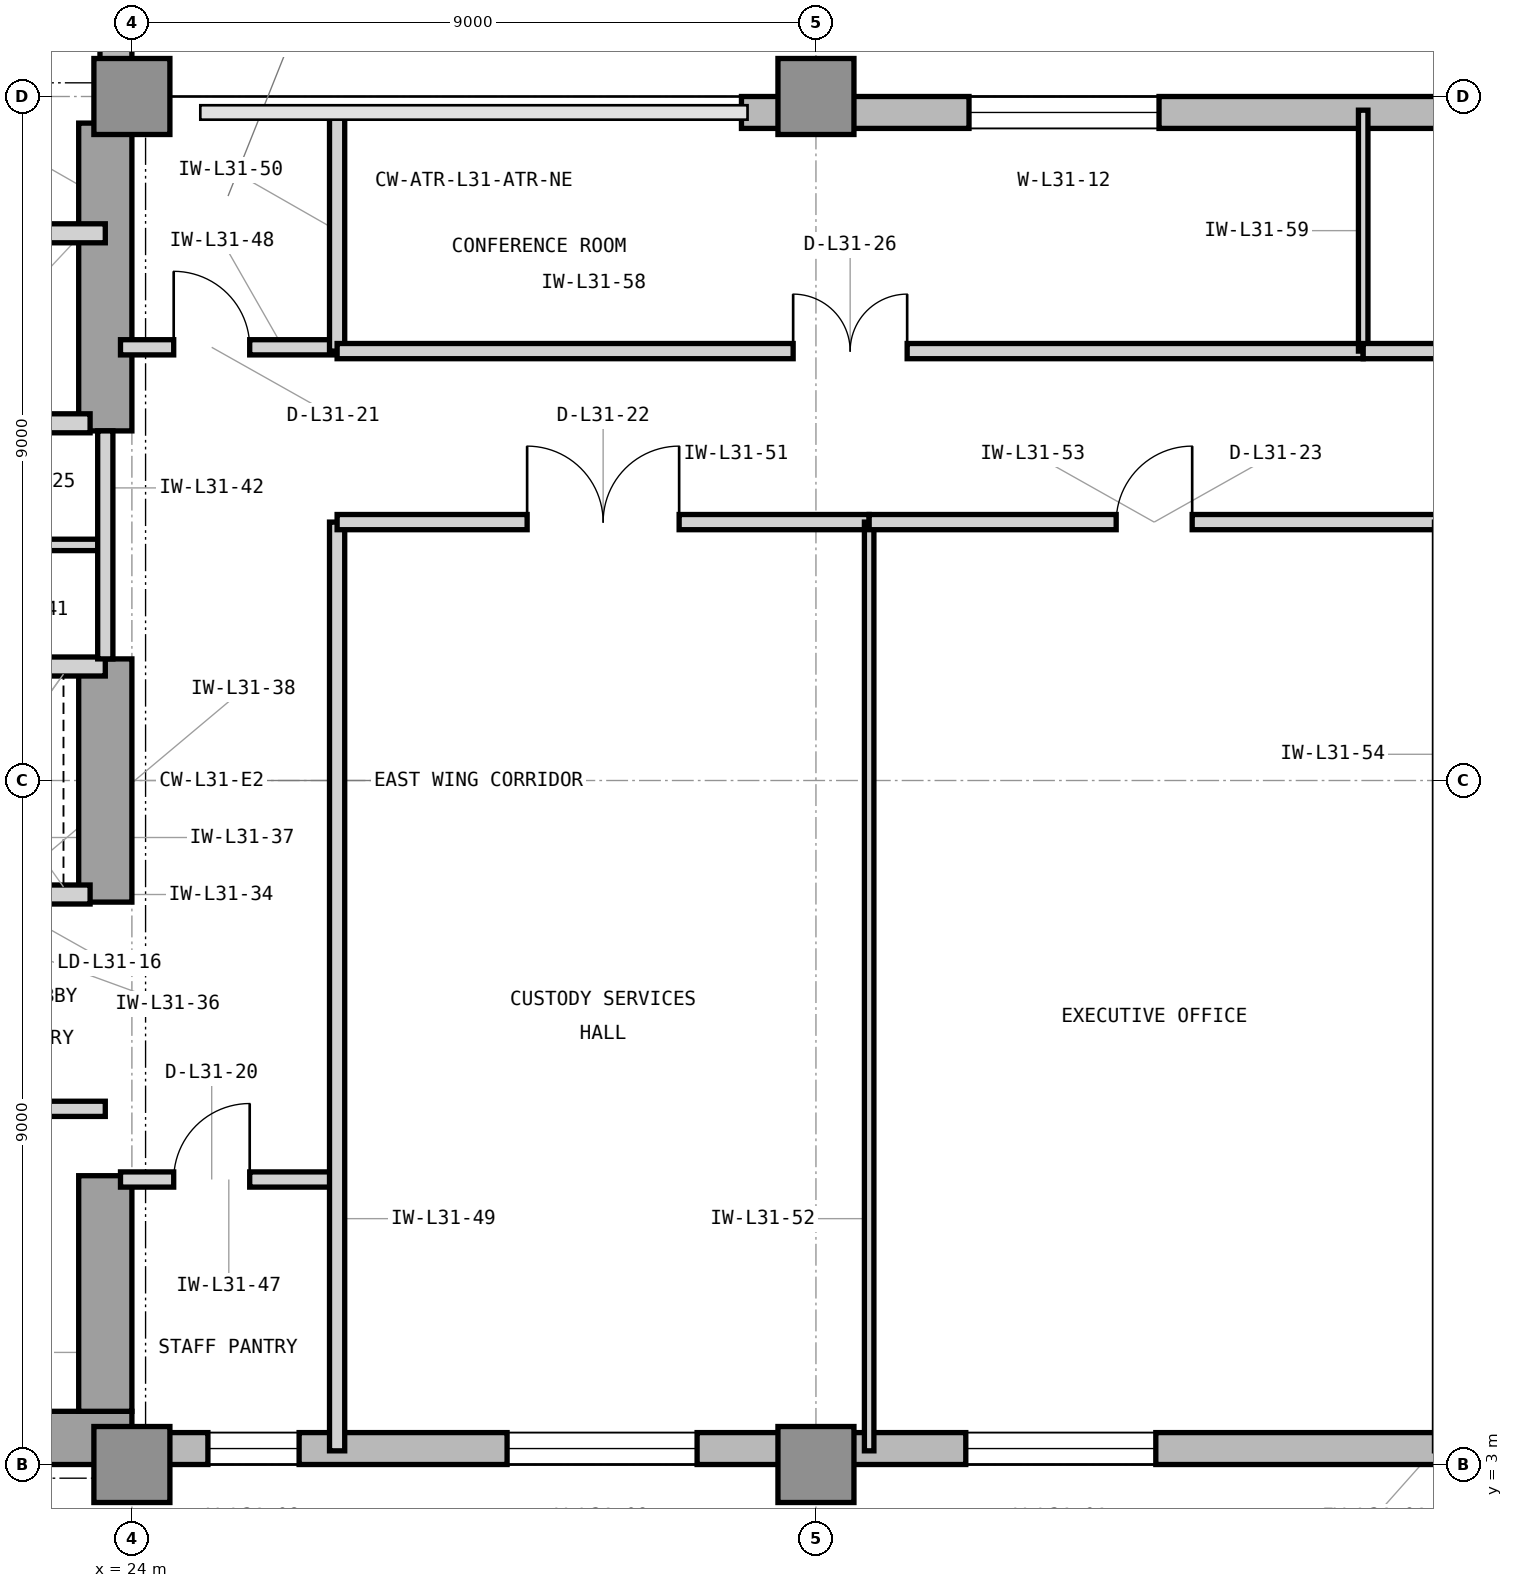
"""IFC4 building model, lengths in metres.
Left out: names, types, materials, properties, quantities, classifications, styles, units other than length and angle.
Written with IfcOpenShell. Run it as: python <this file> out.ifc"""

import sys

from ifc_helpers import new_model, si_unit, direction, frame, frame_2d, origin, origin_2d, place, context, subcontext, project, spatial, rectangle, extrude, element, fill, save


model = new_model("IFC4")
c1 = context("Model", 3, precision=1e-05, world=origin(), true_north=direction((0.0, 1.0)))
c2 = subcontext(c1, "Body", "Model", "MODEL_VIEW")
j1 = project(units=[si_unit("LENGTHUNIT", "METRE"), si_unit("PLANEANGLEUNIT", "RADIAN")], contexts=[c1])
p1 = place(None, origin())
s1 = spatial("IfcSite", under=j1, at=p1, CompositionType="ELEMENT")
p2 = place(p1, origin())
s2 = spatial("IfcBuilding", under=s1, at=p2, CompositionType="ELEMENT")
p3 = place(p2, frame((0.0, 0.0, 132.3)))
s3 = spatial("IfcBuildingStorey", under=s2, at=p3, CompositionType="ELEMENT", Elevation=132.3)
p4 = place(p3, frame((7.475, 3.35, 0.0), z_axis=(0.0, 0.0, 1.0), x_axis=(1.0, 0.0, 0.0)))
e1 = element("IfcWall", 1, at=p4, inside=s3, PredefinedType="SHEAR", context=c2, shape_type="SweptSolid", body=[
    extrude(rectangle(XDim=16.525, YDim=0.7, at=frame_2d((8.262, 0.0))), origin(), (0.0, 0.0, 1.0), 3.9),
])
p5 = place(p3, frame((23.65, 3.7, 0.0), z_axis=(0.0, 0.0, 1.0), x_axis=(0.0, 1.0, 0.0)))
e2 = element("IfcWall", 2, at=p5, inside=s3, PredefinedType="SHEAR", context=c2, shape_type="SweptSolid", body=[
    extrude(rectangle(XDim=3.1, YDim=0.7, at=frame_2d((1.55, 0.0))), origin(), (0.0, 0.0, 1.0), 3.9),
])
p6 = place(p3, frame((23.65, 10.4, 0.0), z_axis=(0.0, 0.0, 1.0), x_axis=(0.0, 1.0, 0.0)))
e3 = element("IfcWall", 3, at=p6, inside=s3, PredefinedType="SHEAR", context=c2, shape_type="SweptSolid", body=[
    extrude(rectangle(XDim=3.2, YDim=0.7, at=frame_2d((1.6, 0.0))), origin(), (0.0, 0.0, 1.0), 3.9),
])
p7 = place(p3, frame((23.65, 16.6, 0.0), z_axis=(0.0, 0.0, 1.0), x_axis=(0.0, 1.0, 0.0)))
e4 = element("IfcWall", 4, at=p7, inside=s3, PredefinedType="SHEAR", context=c2, shape_type="SweptSolid", body=[
    extrude(rectangle(XDim=4.05, YDim=0.7, at=frame_2d((2.025, 0.0))), origin(), (0.0, 0.0, 1.0), 3.9),
])
for number, where, z_axis, x_axis in (
    (5, (24.0, 3.0, 0.0), (0.0, 0.0, 1.0), (1.0, 0.0, 0.0)),
    (6, (24.0, 21.0, 0.0), (0.0, 0.0, 1.0), (1.0, 0.0, 0.0)),
    (7, (33.0, 3.0, 0.0), (0.0, 0.0, 1.0), (1.0, 0.0, 0.0)),
    (8, (33.0, 21.0, 0.0), (0.0, 0.0, 1.0), (1.0, 0.0, 0.0)),
):
    element("IfcColumn", number, at=place(p3, frame(where, z_axis=z_axis, x_axis=x_axis)), inside=s3, PredefinedType="COLUMN", context=c2, shape_type="SweptSolid", body=[
        extrude(rectangle(XDim=1.0, YDim=1.0, at=origin_2d()), origin(), (0.0, 0.0, 1.0), 3.9),
    ])
p8 = place(p3, frame((23.9, 3.21, 0.0), z_axis=(0.0, 0.0, 1.0), x_axis=(1.0, 0.0, 0.0)))
e9 = element("IfcWall", 9, at=p8, inside=s3, PredefinedType="STANDARD", context=c2, shape_type="SweptSolid", body=[
    extrude(rectangle(XDim=34.5, YDim=0.42, at=frame_2d((17.25, 0.0))), origin(), (0.0, 0.0, 1.0), 3.7),
])
p9 = place(p8, frame((11.071, 0.0, 0.85)))
e10 = element("IfcOpeningElement", 10, at=p9, cuts=e9, PredefinedType="OPENING", context=c2, shape_type="SweptSolid", body=[
    extrude(rectangle(XDim=2.5, YDim=2.25, at=frame_2d((1.25, 1.125))), frame((0.0, 0.22, 0.0), z_axis=(0.0, -1.0, 0.0), x_axis=(1.0, 0.0, 0.0)), (0.0, 0.0, 1.0), 0.44),
])
p10 = place(p8, frame((1.1, 0.0, 0.85)))
e11 = element("IfcOpeningElement", 11, at=p10, cuts=e9, PredefinedType="OPENING", context=c2, shape_type="SweptSolid", body=[
    extrude(rectangle(XDim=1.2, YDim=2.25, at=frame_2d((0.6, 1.125))), frame((0.0, 0.22, 0.0), z_axis=(0.0, -1.0, 0.0), x_axis=(1.0, 0.0, 0.0)), (0.0, 0.0, 1.0), 0.44),
])
p11 = place(p8, frame((5.036, 0.0, 0.85)))
e12 = element("IfcOpeningElement", 12, at=p11, cuts=e9, PredefinedType="OPENING", context=c2, shape_type="SweptSolid", body=[
    extrude(rectangle(XDim=2.5, YDim=2.25, at=frame_2d((1.25, 1.125))), frame((0.0, 0.22, 0.0), z_axis=(0.0, -1.0, 0.0), x_axis=(1.0, 0.0, 0.0)), (0.0, 0.0, 1.0), 0.44),
])
p12 = place(p8, frame((19.786, 0.0, 0.85)))
e13 = element("IfcOpeningElement", 13, at=p12, cuts=e9, PredefinedType="OPENING", context=c2, shape_type="SweptSolid", body=[
    extrude(rectangle(XDim=2.5, YDim=2.25, at=frame_2d((1.25, 1.125))), frame((0.0, 0.22, 0.0), z_axis=(0.0, -1.0, 0.0), x_axis=(1.0, 0.0, 0.0)), (0.0, 0.0, 1.0), 0.44),
])
p13 = place(p8, frame((25.086, 0.0, 0.85)))
e14 = element("IfcOpeningElement", 14, at=p13, cuts=e9, PredefinedType="OPENING", context=c2, shape_type="SweptSolid", body=[
    extrude(rectangle(XDim=1.2, YDim=2.25, at=frame_2d((0.6, 1.125))), frame((0.0, 0.22, 0.0), z_axis=(0.0, -1.0, 0.0), x_axis=(1.0, 0.0, 0.0)), (0.0, 0.0, 1.0), 0.44),
])
p14 = place(p3, frame((58.4, 20.79, 0.0), z_axis=(0.0, 0.0, 1.0), x_axis=(-1.0, 0.0, 0.0)))
e15 = element("IfcWall", 15, at=p14, inside=s3, PredefinedType="STANDARD", context=c2, shape_type="SweptSolid", body=[
    extrude(rectangle(XDim=26.38, YDim=0.42, at=frame_2d((13.19, 0.0))), origin(), (0.0, 0.0, 1.0), 3.7),
])
p15 = place(p14, frame((11.94, 0.0, 0.85)))
e16 = element("IfcOpeningElement", 16, at=p15, cuts=e15, PredefinedType="OPENING", context=c2, shape_type="SweptSolid", body=[
    extrude(rectangle(XDim=2.5, YDim=2.25, at=frame_2d((1.25, 1.125))), frame((0.0, 0.22, 0.0), z_axis=(0.0, -1.0, 0.0), x_axis=(1.0, 0.0, 0.0)), (0.0, 0.0, 1.0), 0.44),
])
p16 = place(p14, frame((20.886, 0.0, 0.85)))
e17 = element("IfcOpeningElement", 17, at=p16, cuts=e15, PredefinedType="OPENING", context=c2, shape_type="SweptSolid", body=[
    extrude(rectangle(XDim=2.5, YDim=2.25, at=frame_2d((1.25, 1.125))), frame((0.0, 0.22, 0.0), z_axis=(0.0, -1.0, 0.0), x_axis=(1.0, 0.0, 0.0)), (0.0, 0.0, 1.0), 0.44),
])
p17 = place(p3, frame((23.79, 21.0, 0.0), z_axis=(0.0, 0.0, 1.0), x_axis=(0.0, 1.0, 0.0)))
e18 = element("IfcWall", 18, at=p17, inside=s3, PredefinedType="STANDARD", context=c2, shape_type="SweptSolid", body=[
    extrude(rectangle(XDim=25.4, YDim=0.42, at=frame_2d((12.7, 0.0))), origin(), (0.0, 0.0, 1.0), 3.7),
])
p18 = place(p17, frame((11.45, 0.0, 0.85)))
e19 = element("IfcOpeningElement", 19, at=p18, cuts=e18, PredefinedType="OPENING", context=c2, shape_type="SweptSolid", body=[
    extrude(rectangle(XDim=2.5, YDim=2.25, at=frame_2d((1.25, 1.125))), frame((0.0, 0.22, 0.0), z_axis=(0.0, -1.0, 0.0), x_axis=(1.0, 0.0, 0.0)), (0.0, 0.0, 1.0), 0.44),
])
p19 = place(p3, frame((21.05, 16.7, 0.0), z_axis=(0.0, 0.0, 1.0), x_axis=(1.0, 0.0, 0.0)))
e20 = element("IfcWall", 20, at=p19, inside=s3, PredefinedType="PARTITIONING", context=c2, shape_type="SweptSolid", body=[
    extrude(rectangle(XDim=2.4, YDim=0.25, at=frame_2d((1.2, 0.0))), origin(), (0.0, 0.0, 1.0), 3.233),
])
p20 = place(p3, frame((16.45, 19.2, 0.0), z_axis=(0.0, 0.0, 1.0), x_axis=(1.0, 0.0, 0.0)))
e21 = element("IfcWall", 21, at=p20, inside=s3, PredefinedType="PARTITIONING", context=c2, shape_type="SweptSolid", body=[
    extrude(rectangle(XDim=7.2, YDim=0.25, at=frame_2d((3.6, 0.0))), origin(), (0.0, 0.0, 1.0), 3.69),
])
p21 = place(p3, frame((20.55, 7.68, 0.0), z_axis=(0.0, 0.0, 1.0), x_axis=(1.0, 0.0, 0.0)))
e22 = element("IfcWall", 22, at=p21, inside=s3, PredefinedType="PARTITIONING", context=c2, shape_type="SweptSolid", body=[
    extrude(rectangle(XDim=3.1, YDim=0.2, at=frame_2d((1.55, 0.0))), origin(), (0.0, 0.0, 1.0), 3.69),
])
p22 = place(p21, frame((1.075, 0.0, 0.0)))
e23 = element("IfcOpeningElement", 23, at=p22, cuts=e22, PredefinedType="OPENING", context=c2, shape_type="SweptSolid", body=[
    extrude(rectangle(XDim=0.95, YDim=2.1, at=frame_2d((0.475, 1.05))), frame((0.0, 0.11, 0.0), z_axis=(0.0, -1.0, 0.0), x_axis=(1.0, 0.0, 0.0)), (0.0, 0.0, 1.0), 0.22),
])
p23 = place(p3, frame((21.05, 10.5, 0.0), z_axis=(0.0, 0.0, 1.0), x_axis=(1.0, 0.0, 0.0)))
e24 = element("IfcWall", 24, at=p23, inside=s3, PredefinedType="PARTITIONING", context=c2, shape_type="SweptSolid", body=[
    extrude(rectangle(XDim=2.4, YDim=0.25, at=frame_2d((1.2, 0.0))), origin(), (0.0, 0.0, 1.0), 3.233),
])
p24 = place(p23, frame((0.48, 0.0, 0.0)))
e25 = element("IfcOpeningElement", 25, at=p24, cuts=e24, PredefinedType="OPENING", context=c2, shape_type="SweptSolid", body=[
    extrude(rectangle(XDim=1.15, YDim=2.25, at=frame_2d((0.575, 1.125))), frame((0.0, 0.135, 0.0), z_axis=(0.0, -1.0, 0.0), x_axis=(1.0, 0.0, 0.0)), (0.0, 0.0, 1.0), 0.27),
])
p25 = place(p3, frame((14.7, 13.5, 0.0), z_axis=(0.0, 0.0, 1.0), x_axis=(1.0, 0.0, 0.0)))
e26 = element("IfcWall", 26, at=p25, inside=s3, PredefinedType="PARTITIONING", context=c2, shape_type="SweptSolid", body=[
    extrude(rectangle(XDim=8.95, YDim=0.25, at=frame_2d((4.475, 0.0))), origin(), (0.0, 0.0, 1.0), 3.233),
])
p26 = place(p3, frame((16.6, 15.1, 0.0), z_axis=(0.0, 0.0, 1.0), x_axis=(1.0, 0.0, 0.0)))
e27 = element("IfcWall", 27, at=p26, inside=s3, PredefinedType="PARTITIONING", context=c2, shape_type="SweptSolid", body=[
    extrude(rectangle(XDim=7.05, YDim=0.15, at=frame_2d((3.525, 0.0))), origin(), (0.0, 0.0, 1.0), 3.69),
])
p27 = place(p3, frame((23.65, 13.6, 0.0), z_axis=(0.0, 0.0, 1.0), x_axis=(0.0, 1.0, 0.0)))
e28 = element("IfcWall", 28, at=p27, inside=s3, PredefinedType="PARTITIONING", context=c2, shape_type="SweptSolid", body=[
    extrude(rectangle(XDim=3.0, YDim=0.2, at=frame_2d((1.5, 0.0))), origin(), (0.0, 0.0, 1.0), 3.69),
])
p28 = place(p3, frame((23.85, 6.75, 0.0), z_axis=(0.0, 0.0, 1.0), x_axis=(1.0, 0.0, 0.0)))
e29 = element("IfcWall", 29, at=p28, inside=s3, PredefinedType="PARTITIONING", context=c2, shape_type="SweptSolid", body=[
    extrude(rectangle(XDim=2.85, YDim=0.2, at=frame_2d((1.425, 0.0))), origin(), (0.0, 0.0, 1.0), 3.69),
])
p29 = place(p28, frame((0.7, 0.0, 0.0)))
e30 = element("IfcOpeningElement", 30, at=p29, cuts=e29, PredefinedType="OPENING", context=c2, shape_type="SweptSolid", body=[
    extrude(rectangle(XDim=1.0, YDim=2.15, at=frame_2d((0.5, 1.075))), frame((0.0, 0.11, 0.0), z_axis=(0.0, -1.0, 0.0), x_axis=(1.0, 0.0, 0.0)), (0.0, 0.0, 1.0), 0.22),
])
p30 = place(p3, frame((23.85, 17.7, 0.0), z_axis=(0.0, 0.0, 1.0), x_axis=(1.0, 0.0, 0.0)))
e31 = element("IfcWall", 31, at=p30, inside=s3, PredefinedType="PARTITIONING", context=c2, shape_type="SweptSolid", body=[
    extrude(rectangle(XDim=2.85, YDim=0.2, at=frame_2d((1.425, 0.0))), origin(), (0.0, 0.0, 1.0), 3.69),
])
p31 = place(p30, frame((0.7, 0.0, 0.0)))
e32 = element("IfcOpeningElement", 32, at=p31, cuts=e31, PredefinedType="OPENING", context=c2, shape_type="SweptSolid", body=[
    extrude(rectangle(XDim=1.0, YDim=2.15, at=frame_2d((0.5, 1.075))), frame((0.0, 0.11, 0.0), z_axis=(0.0, -1.0, 0.0), x_axis=(1.0, 0.0, 0.0)), (0.0, 0.0, 1.0), 0.22),
])
p32 = place(p3, frame((26.7, 3.18, 0.0), z_axis=(0.0, 0.0, 1.0), x_axis=(0.0, 1.0, 0.0)))
e33 = element("IfcWall", 33, at=p32, inside=s3, PredefinedType="PARTITIONING", context=c2, shape_type="SweptSolid", body=[
    extrude(rectangle(XDim=12.22, YDim=0.2, at=frame_2d((6.11, 0.0))), origin(), (0.0, 0.0, 1.0), 3.69),
])
p33 = place(p3, frame((26.7, 17.65, 0.0), z_axis=(0.0, 0.0, 1.0), x_axis=(0.0, 1.0, 0.0)))
e34 = element("IfcWall", 34, at=p33, inside=s3, PredefinedType="PARTITIONING", context=c2, shape_type="SweptSolid", body=[
    extrude(rectangle(XDim=3.17, YDim=0.2, at=frame_2d((1.585, 0.0))), origin(), (0.0, 0.0, 1.0), 3.69),
])
p34 = place(p3, frame((26.7, 15.4, 0.0), z_axis=(0.0, 0.0, 1.0), x_axis=(1.0, 0.0, 0.0)))
e35 = element("IfcWall", 35, at=p34, inside=s3, PredefinedType="PARTITIONING", context=c2, shape_type="SweptSolid", body=[
    extrude(rectangle(XDim=7.0, YDim=0.2, at=frame_2d((3.5, 0.0))), origin(), (0.0, 0.0, 1.0), 3.69),
])
p35 = place(p34, frame((2.5, 0.0, 0.0)))
e36 = element("IfcOpeningElement", 36, at=p35, cuts=e35, PredefinedType="OPENING", context=c2, shape_type="SweptSolid", body=[
    extrude(rectangle(XDim=2.0, YDim=2.5, at=frame_2d((1.0, 1.25))), frame((0.0, 0.11, 0.0), z_axis=(0.0, -1.0, 0.0), x_axis=(1.0, 0.0, 0.0)), (0.0, 0.0, 1.0), 0.22),
])
p36 = place(p3, frame((33.7, 3.18, 0.0), z_axis=(0.0, 0.0, 1.0), x_axis=(0.0, 1.0, 0.0)))
e37 = element("IfcWall", 37, at=p36, inside=s3, PredefinedType="PARTITIONING", context=c2, shape_type="SweptSolid", body=[
    extrude(rectangle(XDim=12.22, YDim=0.125, at=frame_2d((6.11, 0.0))), origin(), (0.0, 0.0, 1.0), 3.69),
])
p37 = place(p3, frame((33.7, 15.4, 0.0), z_axis=(0.0, 0.0, 1.0), x_axis=(1.0, 0.0, 0.0)))
e38 = element("IfcWall", 38, at=p37, inside=s3, PredefinedType="PARTITIONING", context=c2, shape_type="SweptSolid", body=[
    extrude(rectangle(XDim=7.5, YDim=0.2, at=frame_2d((3.75, 0.0))), origin(), (0.0, 0.0, 1.0), 3.69),
])
p38 = place(p37, frame((3.25, 0.0, 0.0)))
e39 = element("IfcOpeningElement", 39, at=p38, cuts=e38, PredefinedType="OPENING", context=c2, shape_type="SweptSolid", body=[
    extrude(rectangle(XDim=1.0, YDim=2.15, at=frame_2d((0.5, 1.075))), frame((0.0, 0.11, 0.0), z_axis=(0.0, -1.0, 0.0), x_axis=(1.0, 0.0, 0.0)), (0.0, 0.0, 1.0), 0.22),
])
p39 = place(p3, frame((26.7, 17.65, 0.0), z_axis=(0.0, 0.0, 1.0), x_axis=(1.0, 0.0, 0.0)))
e40 = element("IfcWall", 40, at=p39, inside=s3, PredefinedType="PARTITIONING", context=c2, shape_type="SweptSolid", body=[
    extrude(rectangle(XDim=13.5, YDim=0.2, at=frame_2d((6.75, 0.0))), origin(), (0.0, 0.0, 1.0), 3.69),
])
p40 = place(p39, frame((6.0, 0.0, 0.0)))
e41 = element("IfcOpeningElement", 41, at=p40, cuts=e40, PredefinedType="OPENING", context=c2, shape_type="SweptSolid", body=[
    extrude(rectangle(XDim=1.5, YDim=2.3, at=frame_2d((0.75, 1.15))), frame((0.0, 0.11, 0.0), z_axis=(0.0, -1.0, 0.0), x_axis=(1.0, 0.0, 0.0)), (0.0, 0.0, 1.0), 0.22),
])
p41 = place(p3, frame((40.2, 17.65, 0.0), z_axis=(0.0, 0.0, 1.0), x_axis=(0.0, 1.0, 0.0)))
e42 = element("IfcWall", 42, at=p41, inside=s3, PredefinedType="PARTITIONING", context=c2, shape_type="SweptSolid", body=[
    extrude(rectangle(XDim=3.17, YDim=0.125, at=frame_2d((1.585, 0.0))), origin(), (0.0, 0.0, 1.0), 3.69),
])
p42 = place(p3, frame((40.2, 17.65, 0.0), z_axis=(0.0, 0.0, 1.0), x_axis=(1.0, 0.0, 0.0)))
e43 = element("IfcWall", 43, at=p42, inside=s3, PredefinedType="PARTITIONING", context=c2, shape_type="SweptSolid", body=[
    extrude(rectangle(XDim=12.8, YDim=0.2, at=frame_2d((6.4, 0.0))), origin(), (0.0, 0.0, 1.0), 3.69),
])
p43 = place(p42, frame((5.9, 0.0, 0.0)))
e44 = element("IfcOpeningElement", 44, at=p43, cuts=e43, PredefinedType="OPENING", context=c2, shape_type="SweptSolid", body=[
    extrude(rectangle(XDim=1.0, YDim=2.15, at=frame_2d((0.5, 1.075))), frame((0.0, 0.11, 0.0), z_axis=(0.0, -1.0, 0.0), x_axis=(1.0, 0.0, 0.0)), (0.0, 0.0, 1.0), 0.22),
])
p44 = place(p9, origin())
e45 = element("IfcWindow", 45, at=p44, inside=s3, PartitioningType="SINGLE_PANEL", PredefinedType="WINDOW", context=c2, shape_type="SweptSolid", body=[
    extrude(rectangle(XDim=2.5, YDim=2.25, at=frame_2d((1.25, 1.125))), frame((0.0, 0.11, 0.0), z_axis=(0.0, -1.0, 0.0), x_axis=(1.0, 0.0, 0.0)), (0.0, 0.0, 1.0), 0.06),
])
fill(e10, e45)
p45 = place(p29, origin())
e46 = element("IfcDoor", 46, at=p45, inside=s3, OperationType="SINGLE_SWING_RIGHT", PredefinedType="DOOR", context=c2, shape_type="SweptSolid", body=[
    extrude(rectangle(XDim=1.0, YDim=2.15, at=frame_2d((0.5, 1.075))), frame((0.0, 0.025, 0.0), z_axis=(0.0, -1.0, 0.0), x_axis=(1.0, 0.0, 0.0)), (0.0, 0.0, 1.0), 0.05),
])
fill(e30, e46)
p46 = place(p31, origin())
e47 = element("IfcDoor", 47, at=p46, inside=s3, OperationType="SINGLE_SWING_LEFT", PredefinedType="DOOR", context=c2, shape_type="SweptSolid", body=[
    extrude(rectangle(XDim=1.0, YDim=2.15, at=frame_2d((0.5, 1.075))), frame((0.0, 0.025, 0.0), z_axis=(0.0, -1.0, 0.0), x_axis=(1.0, 0.0, 0.0)), (0.0, 0.0, 1.0), 0.05),
])
fill(e32, e47)
p47 = place(p35, origin())
e48 = element("IfcDoor", 48, at=p47, inside=s3, OperationType="DOUBLE_DOOR_SINGLE_SWING", PredefinedType="DOOR", context=c2, shape_type="SweptSolid", body=[
    extrude(rectangle(XDim=2.0, YDim=2.5, at=frame_2d((1.0, 1.25))), frame((0.0, 0.025, 0.0), z_axis=(0.0, -1.0, 0.0), x_axis=(1.0, 0.0, 0.0)), (0.0, 0.0, 1.0), 0.05),
])
fill(e36, e48)
p48 = place(p38, origin())
e49 = element("IfcDoor", 49, at=p48, inside=s3, OperationType="SINGLE_SWING_RIGHT", PredefinedType="DOOR", context=c2, shape_type="SweptSolid", body=[
    extrude(rectangle(XDim=1.0, YDim=2.15, at=frame_2d((0.5, 1.075))), frame((0.0, 0.025, 0.0), z_axis=(0.0, -1.0, 0.0), x_axis=(1.0, 0.0, 0.0)), (0.0, 0.0, 1.0), 0.05),
])
fill(e39, e49)
p49 = place(p40, origin())
e50 = element("IfcDoor", 50, at=p49, inside=s3, OperationType="DOUBLE_DOOR_SINGLE_SWING", PredefinedType="DOOR", context=c2, shape_type="SweptSolid", body=[
    extrude(rectangle(XDim=1.5, YDim=2.3, at=frame_2d((0.75, 1.15))), frame((0.0, 0.025, 0.0), z_axis=(0.0, -1.0, 0.0), x_axis=(1.0, 0.0, 0.0)), (0.0, 0.0, 1.0), 0.05),
])
fill(e41, e50)
p50 = place(p10, origin())
e51 = element("IfcWindow", 51, at=p50, inside=s3, PartitioningType="SINGLE_PANEL", PredefinedType="WINDOW", context=c2, shape_type="SweptSolid", body=[
    extrude(rectangle(XDim=1.2, YDim=2.25, at=frame_2d((0.6, 1.125))), frame((0.0, 0.11, 0.0), z_axis=(0.0, -1.0, 0.0), x_axis=(1.0, 0.0, 0.0)), (0.0, 0.0, 1.0), 0.06),
])
fill(e11, e51)
p51 = place(p11, origin())
e52 = element("IfcWindow", 52, at=p51, inside=s3, PartitioningType="SINGLE_PANEL", PredefinedType="WINDOW", context=c2, shape_type="SweptSolid", body=[
    extrude(rectangle(XDim=2.5, YDim=2.25, at=frame_2d((1.25, 1.125))), frame((0.0, 0.11, 0.0), z_axis=(0.0, -1.0, 0.0), x_axis=(1.0, 0.0, 0.0)), (0.0, 0.0, 1.0), 0.06),
])
fill(e12, e52)
p52 = place(p16, origin())
e53 = element("IfcWindow", 53, at=p52, inside=s3, PartitioningType="SINGLE_PANEL", PredefinedType="WINDOW", context=c2, shape_type="SweptSolid", body=[
    extrude(rectangle(XDim=2.5, YDim=2.25, at=frame_2d((1.25, 1.125))), frame((0.0, 0.11, 0.0), z_axis=(0.0, -1.0, 0.0), x_axis=(1.0, 0.0, 0.0)), (0.0, 0.0, 1.0), 0.06),
])
fill(e17, e53)
save(model, sys.argv[1])
